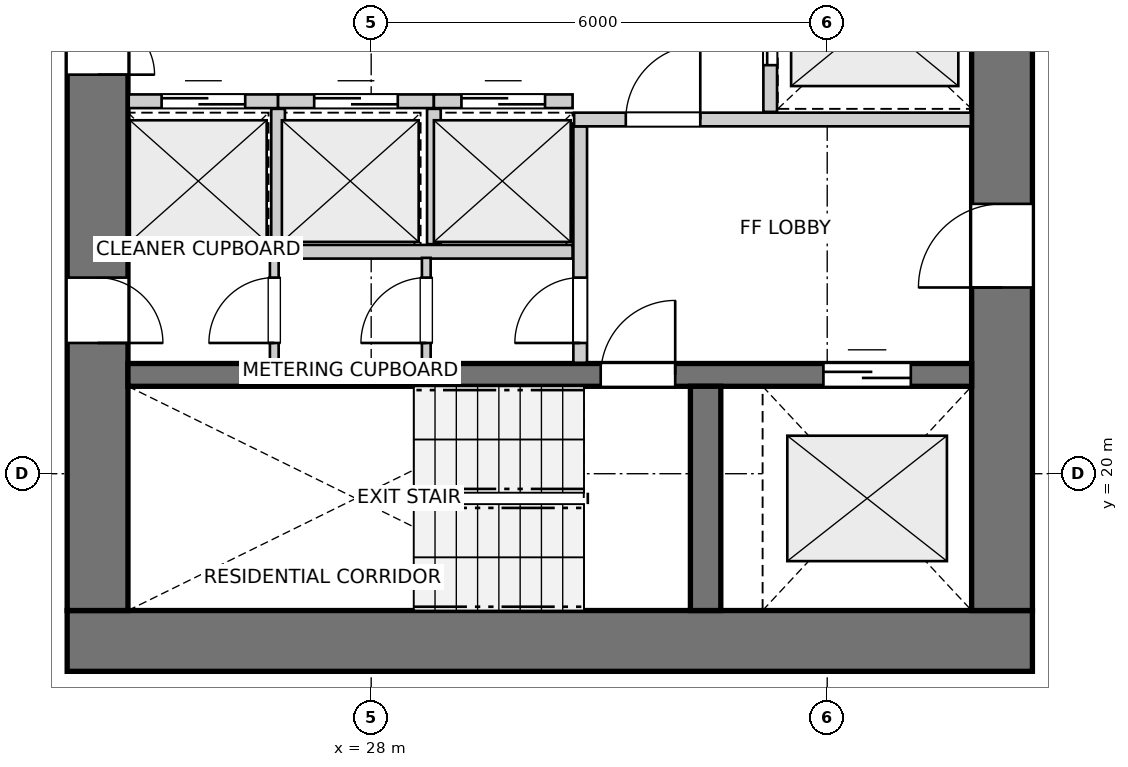
"""IFC4 building model, lengths in metres.
Left out: names, types, materials, properties, quantities, classifications, styles, units other than length and angle.
Written with IfcOpenShell. Run it as: python <this file> out.ifc"""

import sys

from ifc_helpers import new_model, si_unit, direction, frame, frame_2d, origin, place, context, subcontext, project, spatial, rectangle, extrude, source, transform, mapped, element, fill, save


model = new_model("IFC4")
c1 = context("Model", 3, precision=1e-05, world=origin(), true_north=direction((0.0, 1.0)))
c2 = subcontext(c1, "Body", "Model", "MODEL_VIEW")
j1 = project(units=[si_unit("LENGTHUNIT", "METRE"), si_unit("PLANEANGLEUNIT", "RADIAN")], contexts=[c1])
p1 = place(None, origin())
s1 = spatial("IfcSite", under=j1, at=p1, CompositionType="ELEMENT")
p2 = place(p1, origin())
s2 = spatial("IfcBuilding", under=s1, at=p2, CompositionType="ELEMENT")
p3 = place(p2, frame((0.0, 0.0, 62.2)))
s3 = spatial("IfcBuildingStorey", under=s2, at=p3, CompositionType="ELEMENT", Elevation=62.2)
p4 = place(p3, frame((24.0, 17.8, 0.0), z_axis=(0.0, 0.0, 1.0), x_axis=(1.0, 0.0, 0.0)))
e1 = element("IfcWall", 1, at=p4, inside=s3, PredefinedType="SHEAR", context=c2, shape_type="SweptSolid", body=[
    extrude(rectangle(XDim=12.7, YDim=0.8, at=frame_2d((6.35, 0.0))), origin(), (0.0, 0.0, 1.0), 2.9),
])
p5 = place(p3, frame((24.4, 33.8, 0.0), z_axis=(0.0, 0.0, 1.0), x_axis=(0.0, -1.0, 0.0)))
e2 = element("IfcWall", 2, at=p5, inside=s3, PredefinedType="SHEAR", context=c2, shape_type="SweptSolid", body=[
    extrude(rectangle(XDim=15.6, YDim=0.8, at=frame_2d((7.8, 0.0))), origin(), (0.0, 0.0, 1.0), 2.9),
])
p6 = place(p5, frame((7.05, 0.0, 0.0)))
e3 = element("IfcOpeningElement", 3, at=p6, cuts=e2, PredefinedType="OPENING", context=c2, shape_type="SweptSolid", body=[
    extrude(rectangle(XDim=1.5, YDim=2.15, at=frame_2d((0.75, 1.075))), frame((0.0, 0.41, 0.0), z_axis=(0.0, -1.0, 0.0), x_axis=(1.0, 0.0, 0.0)), (0.0, 0.0, 1.0), 0.82),
])
p7 = place(p5, frame((3.52, 0.0, 0.0)))
e4 = element("IfcOpeningElement", 4, at=p7, cuts=e2, PredefinedType="OPENING", context=c2, shape_type="SweptSolid", body=[
    extrude(rectangle(XDim=0.86, YDim=2.05, at=frame_2d((0.43, 1.025))), frame((0.0, 0.41, 0.0), z_axis=(0.0, -1.0, 0.0), x_axis=(1.0, 0.0, 0.0)), (0.0, 0.0, 1.0), 0.82),
])
p8 = place(p5, frame((11.22, 0.0, 0.0)))
e5 = element("IfcOpeningElement", 5, at=p8, cuts=e2, PredefinedType="OPENING", context=c2, shape_type="SweptSolid", body=[
    extrude(rectangle(XDim=0.86, YDim=2.05, at=frame_2d((0.43, 1.025))), frame((0.0, 0.41, 0.0), z_axis=(0.0, -1.0, 0.0), x_axis=(1.0, 0.0, 0.0)), (0.0, 0.0, 1.0), 0.82),
])
p9 = place(p3, frame((36.3, 18.2, 0.0), z_axis=(0.0, 0.0, 1.0), x_axis=(0.0, 1.0, 0.0)))
e6 = element("IfcWall", 6, at=p9, inside=s3, PredefinedType="SHEAR", context=c2, shape_type="SweptSolid", body=[
    extrude(rectangle(XDim=15.6, YDim=0.8, at=frame_2d((7.8, 0.0))), origin(), (0.0, 0.0, 1.0), 2.9),
])
p10 = place(p9, frame((4.25, 0.0, 0.0)))
e7 = element("IfcOpeningElement", 7, at=p10, cuts=e6, PredefinedType="OPENING", context=c2, shape_type="SweptSolid", body=[
    extrude(rectangle(XDim=1.1, YDim=2.15, at=frame_2d((0.55, 1.075))), frame((0.0, 0.41, 0.0), z_axis=(0.0, -1.0, 0.0), x_axis=(1.0, 0.0, 0.0)), (0.0, 0.0, 1.0), 0.82),
])
p11 = place(p9, frame((10.25, 0.0, 0.0)))
e8 = element("IfcOpeningElement", 8, at=p11, cuts=e6, PredefinedType="OPENING", context=c2, shape_type="SweptSolid", body=[
    extrude(rectangle(XDim=1.1, YDim=2.15, at=frame_2d((0.55, 1.075))), frame((0.0, 0.41, 0.0), z_axis=(0.0, -1.0, 0.0), x_axis=(1.0, 0.0, 0.0)), (0.0, 0.0, 1.0), 0.82),
])
p12 = place(p3, frame((24.8, 21.3, 0.0), z_axis=(0.0, 0.0, 1.0), x_axis=(1.0, 0.0, 0.0)))
e9 = element("IfcWall", 9, at=p12, inside=s3, PredefinedType="SHEAR", context=c2, shape_type="SweptSolid", body=[
    extrude(rectangle(XDim=11.1, YDim=0.3, at=frame_2d((5.55, 0.0))), origin(), (0.0, 0.0, 1.0), 2.9),
])
p13 = place(p12, frame((6.22, 0.0, 0.0)))
e10 = element("IfcOpeningElement", 10, at=p13, cuts=e9, PredefinedType="OPENING", context=c2, shape_type="SweptSolid", body=[
    extrude(rectangle(XDim=0.98, YDim=2.15, at=frame_2d((0.49, 1.075))), frame((0.0, 0.16, 0.0), z_axis=(0.0, -1.0, 0.0), x_axis=(1.0, 0.0, 0.0)), (0.0, 0.0, 1.0), 0.32),
])
p14 = place(p12, frame((9.15, 0.0, 0.0)))
e11 = element("IfcOpeningElement", 11, at=p14, cuts=e9, PredefinedType="OPENING", context=c2, shape_type="SweptSolid", body=[
    extrude(rectangle(XDim=1.15, YDim=2.15, at=frame_2d((0.575, 1.075))), frame((0.0, 0.16, 0.0), z_axis=(0.0, -1.0, 0.0), x_axis=(1.0, 0.0, 0.0)), (0.0, 0.0, 1.0), 0.32),
])
p15 = place(p3, frame((32.4, 18.2, 0.0), z_axis=(0.0, 0.0, 1.0), x_axis=(0.0, 1.0, 0.0)))
e12 = element("IfcWall", 12, at=p15, inside=s3, PredefinedType="SHEAR", context=c2, shape_type="SweptSolid", body=[
    extrude(rectangle(XDim=2.95, YDim=0.4, at=frame_2d((1.475, 0.0))), origin(), (0.0, 0.0, 1.0), 2.9),
])
p16 = place(p3, frame((30.75, 21.46, 0.0), z_axis=(0.0, 0.0, 1.0), x_axis=(0.0, 1.0, 0.0)))
e13 = element("IfcWall", 13, at=p16, inside=s3, PredefinedType="PARTITIONING", context=c2, shape_type="SweptSolid", body=[
    extrude(rectangle(XDim=3.11, YDim=0.18, at=frame_2d((1.555, 0.0))), origin(), (0.0, 0.0, 1.0), 2.9),
])
p17 = place(p16, frame((0.26, 0.0, 0.0)))
e14 = element("IfcOpeningElement", 14, at=p17, cuts=e13, PredefinedType="OPENING", context=c2, shape_type="SweptSolid", body=[
    extrude(rectangle(XDim=0.86, YDim=2.05, at=frame_2d((0.43, 1.025))), frame((0.0, 0.1, 0.0), z_axis=(0.0, -1.0, 0.0), x_axis=(1.0, 0.0, 0.0)), (0.0, 0.0, 1.0), 0.2),
])
p18 = place(p3, frame((30.67, 24.66, 0.0), z_axis=(0.0, 0.0, 1.0), x_axis=(1.0, 0.0, 0.0)))
e15 = element("IfcWall", 15, at=p18, inside=s3, PredefinedType="PARTITIONING", context=c2, shape_type="SweptSolid", body=[
    extrude(rectangle(XDim=5.22, YDim=0.18, at=frame_2d((2.61, 0.0))), origin(), (0.0, 0.0, 1.0), 2.9),
])
p19 = place(p18, frame((0.68, 0.0, 0.0)))
e16 = element("IfcOpeningElement", 16, at=p19, cuts=e15, PredefinedType="OPENING", context=c2, shape_type="SweptSolid", body=[
    extrude(rectangle(XDim=0.98, YDim=2.15, at=frame_2d((0.49, 1.075))), frame((0.0, 0.1, 0.0), z_axis=(0.0, -1.0, 0.0), x_axis=(1.0, 0.0, 0.0)), (0.0, 0.0, 1.0), 0.2),
])
p20 = place(p3, frame((33.25, 24.76, 0.0), z_axis=(0.0, 0.0, 1.0), x_axis=(0.0, 1.0, 0.0)))
e17 = element("IfcWall", 17, at=p20, inside=s3, PredefinedType="PARTITIONING", context=c2, shape_type="SweptSolid", body=[
    extrude(rectangle(XDim=2.48, YDim=0.18, at=frame_2d((1.24, 0.0))), origin(), (0.0, 0.0, 1.0), 2.9),
])
p21 = place(p20, frame((0.615, 0.0, 0.0)))
e18 = element("IfcOpeningElement", 18, at=p21, cuts=e17, PredefinedType="OPENING", context=c2, shape_type="SweptSolid", body=[
    extrude(rectangle(XDim=1.25, YDim=2.15, at=frame_2d((0.625, 1.075))), frame((0.0, 0.1, 0.0), z_axis=(0.0, -1.0, 0.0), x_axis=(1.0, 0.0, 0.0)), (0.0, 0.0, 1.0), 0.2),
])
p22 = place(p3, frame((24.81, 22.92, 0.0), z_axis=(0.0, 0.0, 1.0), x_axis=(1.0, 0.0, 0.0)))
e19 = element("IfcWall", 19, at=p22, inside=s3, PredefinedType="PARTITIONING", context=c2, shape_type="SweptSolid", body=[
    extrude(rectangle(XDim=5.84, YDim=0.18, at=frame_2d((2.92, 0.0))), origin(), (0.0, 0.0, 1.0), 2.9),
])
p23 = place(p3, frame((24.81, 24.9, 0.0), z_axis=(0.0, 0.0, 1.0), x_axis=(1.0, 0.0, 0.0)))
e20 = element("IfcWall", 20, at=p23, inside=s3, PredefinedType="PARTITIONING", context=c2, shape_type="SweptSolid", body=[
    extrude(rectangle(XDim=1.965, YDim=0.18, at=frame_2d((0.982, 0.0))), origin(), (0.0, 0.0, 1.0), 2.9),
])
p24 = place(p23, frame((0.433, 0.0, 0.0)))
e21 = element("IfcOpeningElement", 21, at=p24, cuts=e20, PredefinedType="OPENING", context=c2, shape_type="SweptSolid", body=[
    extrude(rectangle(XDim=1.1, YDim=2.15, at=frame_2d((0.55, 1.075))), frame((0.0, 0.1, 0.0), z_axis=(0.0, -1.0, 0.0), x_axis=(1.0, 0.0, 0.0)), (0.0, 0.0, 1.0), 0.2),
])
p25 = place(p3, frame((26.775, 24.9, 0.0), z_axis=(0.0, 0.0, 1.0), x_axis=(1.0, 0.0, 0.0)))
e22 = element("IfcWall", 22, at=p25, inside=s3, PredefinedType="PARTITIONING", context=c2, shape_type="SweptSolid", body=[
    extrude(rectangle(XDim=2.05, YDim=0.18, at=frame_2d((1.025, 0.0))), origin(), (0.0, 0.0, 1.0), 2.9),
])
p26 = place(p25, frame((0.475, 0.0, 0.0)))
e23 = element("IfcOpeningElement", 23, at=p26, cuts=e22, PredefinedType="OPENING", context=c2, shape_type="SweptSolid", body=[
    extrude(rectangle(XDim=1.1, YDim=2.15, at=frame_2d((0.55, 1.075))), frame((0.0, 0.1, 0.0), z_axis=(0.0, -1.0, 0.0), x_axis=(1.0, 0.0, 0.0)), (0.0, 0.0, 1.0), 0.2),
])
p27 = place(p3, frame((26.775, 23.02, 0.0), z_axis=(0.0, 0.0, 1.0), x_axis=(0.0, 1.0, 0.0)))
e24 = element("IfcWall", 24, at=p27, inside=s3, PredefinedType="PARTITIONING", context=c2, shape_type="SweptSolid", body=[
    extrude(rectangle(XDim=1.78, YDim=0.18, at=frame_2d((0.89, 0.0))), origin(), (0.0, 0.0, 1.0), 2.9),
])
p28 = place(p3, frame((28.825, 24.9, 0.0), z_axis=(0.0, 0.0, 1.0), x_axis=(1.0, 0.0, 0.0)))
e25 = element("IfcWall", 25, at=p28, inside=s3, PredefinedType="PARTITIONING", context=c2, shape_type="SweptSolid", body=[
    extrude(rectangle(XDim=1.825, YDim=0.18, at=frame_2d((0.913, 0.0))), origin(), (0.0, 0.0, 1.0), 2.9),
])
p29 = place(p28, frame((0.363, 0.0, 0.0)))
e26 = element("IfcOpeningElement", 26, at=p29, cuts=e25, PredefinedType="OPENING", context=c2, shape_type="SweptSolid", body=[
    extrude(rectangle(XDim=1.1, YDim=2.15, at=frame_2d((0.55, 1.075))), frame((0.0, 0.1, 0.0), z_axis=(0.0, -1.0, 0.0), x_axis=(1.0, 0.0, 0.0)), (0.0, 0.0, 1.0), 0.2),
])
p30 = place(p3, frame((28.825, 23.02, 0.0), z_axis=(0.0, 0.0, 1.0), x_axis=(0.0, 1.0, 0.0)))
e27 = element("IfcWall", 27, at=p30, inside=s3, PredefinedType="PARTITIONING", context=c2, shape_type="SweptSolid", body=[
    extrude(rectangle(XDim=1.78, YDim=0.18, at=frame_2d((0.89, 0.0))), origin(), (0.0, 0.0, 1.0), 2.9),
])
p31 = place(p3, frame((26.725, 21.46, 0.0), z_axis=(0.0, 0.0, 1.0), x_axis=(0.0, 1.0, 0.0)))
e28 = element("IfcWall", 28, at=p31, inside=s3, PredefinedType="PARTITIONING", context=c2, shape_type="SweptSolid", body=[
    extrude(rectangle(XDim=1.38, YDim=0.115, at=frame_2d((0.69, 0.0))), origin(), (0.0, 0.0, 1.0), 2.9),
])
p32 = place(p31, frame((0.26, 0.0, 0.0)))
e29 = element("IfcOpeningElement", 29, at=p32, cuts=e28, PredefinedType="OPENING", context=c2, shape_type="SweptSolid", body=[
    extrude(rectangle(XDim=0.86, YDim=2.05, at=frame_2d((0.43, 1.025))), frame((0.0, 0.067, 0.0), z_axis=(0.0, -1.0, 0.0), x_axis=(1.0, 0.0, 0.0)), (0.0, 0.0, 1.0), 0.135),
])
p33 = place(p3, frame((28.725, 21.46, 0.0), z_axis=(0.0, 0.0, 1.0), x_axis=(0.0, 1.0, 0.0)))
e30 = element("IfcWall", 30, at=p33, inside=s3, PredefinedType="PARTITIONING", context=c2, shape_type="SweptSolid", body=[
    extrude(rectangle(XDim=1.38, YDim=0.115, at=frame_2d((0.69, 0.0))), origin(), (0.0, 0.0, 1.0), 2.9),
])
p34 = place(p33, frame((0.26, 0.0, 0.0)))
e31 = element("IfcOpeningElement", 31, at=p34, cuts=e30, PredefinedType="OPENING", context=c2, shape_type="SweptSolid", body=[
    extrude(rectangle(XDim=0.86, YDim=2.05, at=frame_2d((0.43, 1.025))), frame((0.0, 0.067, 0.0), z_axis=(0.0, -1.0, 0.0), x_axis=(1.0, 0.0, 0.0)), (0.0, 0.0, 1.0), 0.135),
])
m1 = source(origin(), c2, "Body", "SweptSolid", [
    extrude(rectangle(XDim=0.98, YDim=2.15, at=frame_2d((0.49, 1.075))), frame((0.0, 0.025, 0.0), z_axis=(0.0, -1.0, 0.0), x_axis=(1.0, 0.0, 0.0)), (0.0, 0.0, 1.0), 0.05),
])
p35 = place(p13, origin())
e32 = element("IfcDoor", 32, at=p35, inside=s3, OperationType="SINGLE_SWING_RIGHT", PredefinedType="DOOR", context=c2, shape_type="MappedRepresentation", body=[
    mapped(m1, transform((0.0, 0.0, 0.0), x_axis=(1.0, 0.0, 0.0), y_axis=(0.0, 1.0, 0.0), z_axis=(0.0, 0.0, 1.0), scale=1.0)),
])
fill(e10, e32)
m2 = source(origin(), c2, "Body", "SweptSolid", [
    extrude(rectangle(XDim=1.15, YDim=2.15, at=frame_2d((0.575, 1.075))), frame((0.0, 0.025, 0.0), z_axis=(0.0, -1.0, 0.0), x_axis=(1.0, 0.0, 0.0)), (0.0, 0.0, 1.0), 0.05),
])
p36 = place(p14, origin())
e33 = element("IfcDoor", 33, at=p36, inside=s3, OperationType="DOUBLE_DOOR_SLIDING", PredefinedType="DOOR", context=c2, shape_type="MappedRepresentation", body=[
    mapped(m2, transform((0.0, 0.0, 0.0), x_axis=(1.0, 0.0, 0.0), y_axis=(0.0, 1.0, 0.0), z_axis=(0.0, 0.0, 1.0), scale=1.0)),
])
fill(e11, e33)
m3 = source(origin(), c2, "Body", "SweptSolid", [
    extrude(rectangle(XDim=1.1, YDim=2.15, at=frame_2d((0.55, 1.075))), frame((0.0, 0.025, 0.0), z_axis=(0.0, -1.0, 0.0), x_axis=(1.0, 0.0, 0.0)), (0.0, 0.0, 1.0), 0.05),
])
p37 = place(p10, origin())
e34 = element("IfcDoor", 34, at=p37, inside=s3, OperationType="SINGLE_SWING_LEFT", PredefinedType="DOOR", context=c2, shape_type="MappedRepresentation", body=[
    mapped(m3, transform((0.0, 0.0, 0.0), x_axis=(1.0, 0.0, 0.0), y_axis=(0.0, 1.0, 0.0), z_axis=(0.0, 0.0, 1.0), scale=1.0)),
])
fill(e7, e34)
m4 = source(origin(), c2, "Body", "SweptSolid", [
    extrude(rectangle(XDim=1.5, YDim=2.15, at=frame_2d((0.75, 1.075))), frame((0.0, 0.025, 0.0), z_axis=(0.0, -1.0, 0.0), x_axis=(1.0, 0.0, 0.0)), (0.0, 0.0, 1.0), 0.05),
])
p38 = place(p6, origin())
e35 = element("IfcDoor", 35, at=p38, inside=s3, OperationType="DOUBLE_DOOR_SINGLE_SWING", PredefinedType="DOOR", context=c2, shape_type="MappedRepresentation", body=[
    mapped(m4, transform((0.0, 0.0, 0.0), x_axis=(1.0, 0.0, 0.0), y_axis=(0.0, 1.0, 0.0), z_axis=(0.0, 0.0, 1.0), scale=1.0)),
])
fill(e3, e35)
m5 = source(origin(), c2, "Body", "SweptSolid", [
    extrude(rectangle(XDim=0.86, YDim=2.05, at=frame_2d((0.43, 1.025))), frame((0.0, 0.025, 0.0), z_axis=(0.0, -1.0, 0.0), x_axis=(1.0, 0.0, 0.0)), (0.0, 0.0, 1.0), 0.05),
])
p39 = place(p8, origin())
e36 = element("IfcDoor", 36, at=p39, inside=s3, OperationType="SINGLE_SWING_RIGHT", PredefinedType="DOOR", context=c2, shape_type="MappedRepresentation", body=[
    mapped(m5, transform((0.0, 0.0, 0.0), x_axis=(1.0, 0.0, 0.0), y_axis=(0.0, 1.0, 0.0), z_axis=(0.0, 0.0, 1.0), scale=1.0)),
])
fill(e5, e36)
p40 = place(p17, origin())
e37 = element("IfcDoor", 37, at=p40, inside=s3, OperationType="SINGLE_SWING_LEFT", PredefinedType="DOOR", context=c2, shape_type="MappedRepresentation", body=[
    mapped(m5, transform((0.0, 0.0, 0.0), x_axis=(1.0, 0.0, 0.0), y_axis=(0.0, 1.0, 0.0), z_axis=(0.0, 0.0, 1.0), scale=1.0)),
])
fill(e14, e37)
p41 = place(p19, origin())
e38 = element("IfcDoor", 38, at=p41, inside=s3, OperationType="SINGLE_SWING_RIGHT", PredefinedType="DOOR", context=c2, shape_type="MappedRepresentation", body=[
    mapped(m1, transform((0.0, 0.0, 0.0), x_axis=(1.0, 0.0, 0.0), y_axis=(0.0, 1.0, 0.0), z_axis=(0.0, 0.0, 1.0), scale=1.0)),
])
fill(e16, e38)
m6 = source(origin(), c2, "Body", "SweptSolid", [
    extrude(rectangle(XDim=1.25, YDim=2.15, at=frame_2d((0.625, 1.075))), frame((0.0, 0.025, 0.0), z_axis=(0.0, -1.0, 0.0), x_axis=(1.0, 0.0, 0.0)), (0.0, 0.0, 1.0), 0.05),
])
p42 = place(p21, origin())
e39 = element("IfcDoor", 39, at=p42, inside=s3, OperationType="DOUBLE_DOOR_SLIDING", PredefinedType="DOOR", context=c2, shape_type="MappedRepresentation", body=[
    mapped(m6, transform((0.0, 0.0, 0.0), x_axis=(1.0, 0.0, 0.0), y_axis=(0.0, 1.0, 0.0), z_axis=(0.0, 0.0, 1.0), scale=1.0)),
])
fill(e18, e39)
p43 = place(p24, origin())
e40 = element("IfcDoor", 40, at=p43, inside=s3, OperationType="DOUBLE_DOOR_SLIDING", PredefinedType="DOOR", context=c2, shape_type="MappedRepresentation", body=[
    mapped(m3, transform((0.0, 0.0, 0.0), x_axis=(1.0, 0.0, 0.0), y_axis=(0.0, 1.0, 0.0), z_axis=(0.0, 0.0, 1.0), scale=1.0)),
])
fill(e21, e40)
p44 = place(p26, origin())
e41 = element("IfcDoor", 41, at=p44, inside=s3, OperationType="DOUBLE_DOOR_SLIDING", PredefinedType="DOOR", context=c2, shape_type="MappedRepresentation", body=[
    mapped(m3, transform((0.0, 0.0, 0.0), x_axis=(1.0, 0.0, 0.0), y_axis=(0.0, 1.0, 0.0), z_axis=(0.0, 0.0, 1.0), scale=1.0)),
])
fill(e23, e41)
p45 = place(p29, origin())
e42 = element("IfcDoor", 42, at=p45, inside=s3, OperationType="DOUBLE_DOOR_SLIDING", PredefinedType="DOOR", context=c2, shape_type="MappedRepresentation", body=[
    mapped(m3, transform((0.0, 0.0, 0.0), x_axis=(1.0, 0.0, 0.0), y_axis=(0.0, 1.0, 0.0), z_axis=(0.0, 0.0, 1.0), scale=1.0)),
])
fill(e26, e42)
p46 = place(p32, origin())
e43 = element("IfcDoor", 43, at=p46, inside=s3, OperationType="SINGLE_SWING_LEFT", PredefinedType="DOOR", context=c2, shape_type="MappedRepresentation", body=[
    mapped(m5, transform((0.0, 0.0, 0.0), x_axis=(1.0, 0.0, 0.0), y_axis=(0.0, 1.0, 0.0), z_axis=(0.0, 0.0, 1.0), scale=1.0)),
])
fill(e29, e43)
p47 = place(p34, origin())
e44 = element("IfcDoor", 44, at=p47, inside=s3, OperationType="SINGLE_SWING_LEFT", PredefinedType="DOOR", context=c2, shape_type="MappedRepresentation", body=[
    mapped(m5, transform((0.0, 0.0, 0.0), x_axis=(1.0, 0.0, 0.0), y_axis=(0.0, 1.0, 0.0), z_axis=(0.0, 0.0, 1.0), scale=1.0)),
])
fill(e31, e44)
save(model, sys.argv[1])
